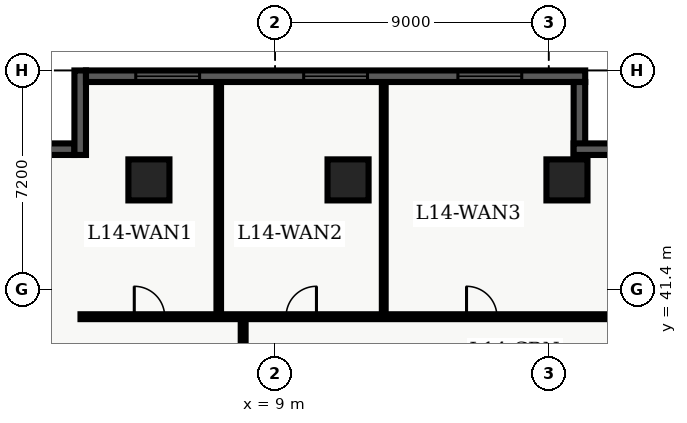
"""IFC4 building model, lengths in metres.
Left out: names, types, materials, properties, quantities, classifications, styles, units other than length and angle.
Written with IfcOpenShell. Run it as: python <this file> out.ifc"""

import sys

from ifc_helpers import new_model, entity, si_unit, converted_unit, direction, frame, origin_with_axes, origin_2d_with_axis, place, context, subcontext, project, spatial, polyline, rectangle, outline, extrude, element, fill, save


model = new_model("IFC4")
c1 = context("Model", 3, precision=1e-05, world=origin_with_axes(), true_north=direction((0.0, 1.0)))
c2 = subcontext(c1, "Body", "Model", "MODEL_VIEW")
j1 = project(units=[si_unit("LENGTHUNIT", "METRE"), converted_unit("PLANEANGLEUNIT", "DEGREE", entity("IfcPlaneAngleMeasure", 0.017), si_unit("PLANEANGLEUNIT", "RADIAN"), dimensions=[0, 0, 0, 0, 0, 0, 0])], contexts=[c1])
p1 = place(None, origin_with_axes())
s1 = spatial("IfcSite", under=j1, at=p1, CompositionType="ELEMENT")
p2 = place(p1, origin_with_axes())
s2 = spatial("IfcBuilding", under=s1, at=p2, CompositionType="ELEMENT")
p3 = place(p2, frame((0.0, 0.0, 60.0), z_axis=(0.0, 0.0, 1.0), x_axis=(1.0, 0.0, 0.0)))
s3 = spatial("IfcBuildingStorey", under=s2, at=p3, CompositionType="ELEMENT", Elevation=60.0)
for number, where, z_axis, x_axis in (
    (1, (11.4, 45.0, 0.0), (0.0, 0.0, 1.0), (1.0, 0.0, 0.0)),
    (2, (18.6, 45.0, 0.0), (0.0, 0.0, 1.0), (1.0, 0.0, 0.0)),
    (3, (4.85, 45.0, 0.0), (0.0, 0.0, 1.0), (1.0, 0.0, 0.0)),
):
    element("IfcColumn", number, at=place(p3, frame(where, z_axis=z_axis, x_axis=x_axis)), inside=s3, PredefinedType="COLUMN", context=c2, shape_type="SweptSolid", body=[
        extrude(rectangle(XDim=1.35, YDim=1.35, at=origin_2d_with_axis()), origin_with_axes(), (0.0, 0.0, 1.0), 3.9),
    ])
p4 = place(p3, frame((2.6, 40.5, 0.0), z_axis=(0.0, 0.0, 1.0), x_axis=(1.0, 0.0, 0.0)))
e4 = element("IfcWall", 4, at=p4, inside=s3, PredefinedType="PARTITIONING", context=c2, shape_type="SweptSolid", body=[
    extrude(outline(polyline([(0.0, -0.08), (18.65, -0.08), (18.65, 0.08), (0.0, 0.08), (0.0, -0.08)])), origin_with_axes(), (0.0, 0.0, 1.0), 2.7),
])
p5 = place(p4, frame((2.268, 0.0, 0.0), z_axis=(0.0, 0.0, 1.0), x_axis=(1.0, 0.0, 0.0)))
e5 = element("IfcOpeningElement", 5, at=p5, cuts=e4, PredefinedType="OPENING", context=c2, shape_type="SweptSolid", body=[
    extrude(rectangle(XDim=1.0, YDim=0.18, at=origin_2d_with_axis()), origin_with_axes(), (0.0, 0.0, 1.0), 2.15),
])
p6 = place(p4, frame((7.261, 0.0, 0.0), z_axis=(0.0, 0.0, 1.0), x_axis=(1.0, 0.0, 0.0)))
e6 = element("IfcOpeningElement", 6, at=p6, cuts=e4, PredefinedType="OPENING", context=c2, shape_type="SweptSolid", body=[
    extrude(rectangle(XDim=1.0, YDim=0.18, at=origin_2d_with_axis()), origin_with_axes(), (0.0, 0.0, 1.0), 2.15),
])
p7 = place(p4, frame((13.197, 0.0, 0.0), z_axis=(0.0, 0.0, 1.0), x_axis=(1.0, 0.0, 0.0)))
e7 = element("IfcOpeningElement", 7, at=p7, cuts=e4, PredefinedType="OPENING", context=c2, shape_type="SweptSolid", body=[
    extrude(rectangle(XDim=1.0, YDim=0.18, at=origin_2d_with_axis()), origin_with_axes(), (0.0, 0.0, 1.0), 2.15),
])
p8 = place(p3, frame((7.95, 7.8, 0.0), z_axis=(0.0, 0.0, 1.0), x_axis=(0.0, 1.0, 0.0)))
e8 = element("IfcWall", 8, at=p8, inside=s3, PredefinedType="PARTITIONING", context=c2, shape_type="SweptSolid", body=[
    extrude(outline(polyline([(0.0, -0.08), (32.7, -0.08), (32.7, 0.08), (0.0, 0.08), (0.0, -0.08)])), origin_with_axes(), (0.0, 0.0, 1.0), 2.7),
])
p9 = place(p8, frame((2.288, 0.0, 0.0), z_axis=(0.0, 0.0, 1.0), x_axis=(1.0, 0.0, 0.0)))
e9 = element("IfcOpeningElement", 9, at=p9, cuts=e8, PredefinedType="OPENING", context=c2, shape_type="SweptSolid", body=[
    extrude(rectangle(XDim=1.0, YDim=0.18, at=origin_2d_with_axis()), origin_with_axes(), (0.0, 0.0, 1.0), 2.15),
])
p10 = place(p8, frame((6.971, 0.0, 0.0), z_axis=(0.0, 0.0, 1.0), x_axis=(1.0, 0.0, 0.0)))
e10 = element("IfcOpeningElement", 10, at=p10, cuts=e8, PredefinedType="OPENING", context=c2, shape_type="SweptSolid", body=[
    extrude(rectangle(XDim=1.0, YDim=0.18, at=origin_2d_with_axis()), origin_with_axes(), (0.0, 0.0, 1.0), 2.15),
])
p11 = place(p8, frame((12.598, 0.0, 0.0), z_axis=(0.0, 0.0, 1.0), x_axis=(1.0, 0.0, 0.0)))
e11 = element("IfcOpeningElement", 11, at=p11, cuts=e8, PredefinedType="OPENING", context=c2, shape_type="SweptSolid", body=[
    extrude(rectangle(XDim=1.0, YDim=0.18, at=origin_2d_with_axis()), origin_with_axes(), (0.0, 0.0, 1.0), 2.15),
])
p12 = place(p8, frame((19.386, 0.0, 0.0), z_axis=(0.0, 0.0, 1.0), x_axis=(1.0, 0.0, 0.0)))
e12 = element("IfcOpeningElement", 12, at=p12, cuts=e8, PredefinedType="OPENING", context=c2, shape_type="SweptSolid", body=[
    extrude(rectangle(XDim=1.0, YDim=0.18, at=origin_2d_with_axis()), origin_with_axes(), (0.0, 0.0, 1.0), 2.15),
])
p13 = place(p8, frame((27.82, 0.0, 0.0), z_axis=(0.0, 0.0, 1.0), x_axis=(1.0, 0.0, 0.0)))
e13 = element("IfcOpeningElement", 13, at=p13, cuts=e8, PredefinedType="OPENING", context=c2, shape_type="SweptSolid", body=[
    extrude(rectangle(XDim=1.0, YDim=0.18, at=origin_2d_with_axis()), origin_with_axes(), (0.0, 0.0, 1.0), 2.15),
])
p14 = place(p3, frame((7.147, 40.6, 0.0), z_axis=(0.0, 0.0, 1.0), x_axis=(0.0, 1.0, 0.0)))
e14 = element("IfcWall", 14, at=p14, inside=s3, PredefinedType="PARTITIONING", context=c2, shape_type="SweptSolid", body=[
    extrude(outline(polyline([(0.0, -0.075), (7.64, -0.075), (7.64, 0.075), (0.0, 0.075), (0.0, -0.075)])), origin_with_axes(), (0.0, 0.0, 1.0), 2.7),
])
p15 = place(p3, frame((12.574, 40.6, 0.0), z_axis=(0.0, 0.0, 1.0), x_axis=(0.0, 1.0, 0.0)))
e15 = element("IfcWall", 15, at=p15, inside=s3, PredefinedType="PARTITIONING", context=c2, shape_type="SweptSolid", body=[
    extrude(outline(polyline([(0.0, -0.062), (7.64, -0.062), (7.64, 0.062), (0.0, 0.062), (0.0, -0.062)])), origin_with_axes(), (0.0, 0.0, 1.0), 2.7),
])
p16 = place(p3, frame((0.38, 46.01, 0.0), z_axis=(0.0, 0.0, 1.0), x_axis=(1.0, 0.0, 0.0)))
e16 = element("IfcWall", 16, at=p16, inside=s3, PredefinedType="SOLIDWALL", context=c2, shape_type="SweptSolid", body=[
    extrude(outline(polyline([(0.0, -0.19), (2.02, -0.19), (2.02, 0.19), (0.0, 0.19), (0.0, -0.19)])), origin_with_axes(), (0.0, 0.0, 1.0), 3.66),
])
p17 = place(p3, frame((2.59, 45.82, 0.0), z_axis=(0.0, 0.0, 1.0), x_axis=(0.0, 1.0, 0.0)))
e17 = element("IfcWall", 17, at=p17, inside=s3, PredefinedType="SOLIDWALL", context=c2, shape_type="SweptSolid", body=[
    extrude(outline(polyline([(0.0, -0.19), (2.78, -0.19), (2.78, 0.19), (0.0, 0.19), (0.0, -0.19)])), origin_with_axes(), (0.0, 0.0, 1.0), 3.66),
])
p18 = place(p3, frame((2.78, 48.41, 0.0), z_axis=(0.0, 0.0, 1.0), x_axis=(1.0, 0.0, 0.0)))
e18 = element("IfcWall", 18, at=p18, inside=s3, PredefinedType="SOLIDWALL", context=c2, shape_type="SweptSolid", body=[
    extrude(outline(polyline([(0.0, -0.19), (16.42, -0.19), (16.42, 0.19), (0.0, 0.19), (0.0, -0.19)])), origin_with_axes(), (0.0, 0.0, 1.0), 3.66),
])
p19 = place(p18, frame((2.687, 0.0, 0.45), z_axis=(0.0, 0.0, 1.0), x_axis=(1.0, 0.0, 0.0)))
e19 = element("IfcOpeningElement", 19, at=p19, cuts=e18, PredefinedType="OPENING", context=c2, shape_type="SweptSolid", body=[
    extrude(rectangle(XDim=2.1, YDim=0.4, at=origin_2d_with_axis()), origin_with_axes(), (0.0, 0.0, 1.0), 2.2),
])
p20 = place(p18, frame((8.21, 0.0, 0.45), z_axis=(0.0, 0.0, 1.0), x_axis=(1.0, 0.0, 0.0)))
e20 = element("IfcOpeningElement", 20, at=p20, cuts=e18, PredefinedType="OPENING", context=c2, shape_type="SweptSolid", body=[
    extrude(rectangle(XDim=2.1, YDim=0.4, at=origin_2d_with_axis()), origin_with_axes(), (0.0, 0.0, 1.0), 2.2),
])
p21 = place(p18, frame((13.283, 0.0, 0.45), z_axis=(0.0, 0.0, 1.0), x_axis=(1.0, 0.0, 0.0)))
e21 = element("IfcOpeningElement", 21, at=p21, cuts=e18, PredefinedType="OPENING", context=c2, shape_type="SweptSolid", body=[
    extrude(rectangle(XDim=2.1, YDim=0.4, at=origin_2d_with_axis()), origin_with_axes(), (0.0, 0.0, 1.0), 2.2),
])
p22 = place(p3, frame((19.01, 48.22, 0.0), z_axis=(0.0, 0.0, 1.0), x_axis=(0.0, -1.0, 0.0)))
e22 = element("IfcWall", 22, at=p22, inside=s3, PredefinedType="SOLIDWALL", context=c2, shape_type="SweptSolid", body=[
    extrude(outline(polyline([(0.0, -0.19), (2.56, -0.19), (2.56, 0.19), (0.0, 0.19), (0.0, -0.19)])), origin_with_axes(), (0.0, 0.0, 1.0), 3.66),
])
p23 = place(p3, frame((18.82, 46.01, 0.0), z_axis=(0.0, 0.0, 1.0), x_axis=(1.0, 0.0, 0.0)))
e23 = element("IfcWall", 23, at=p23, inside=s3, PredefinedType="SOLIDWALL", context=c2, shape_type="SweptSolid", body=[
    extrude(outline(polyline([(0.0, -0.19), (2.78, -0.19), (2.78, 0.19), (0.0, 0.19), (0.0, -0.19)])), origin_with_axes(), (0.0, 0.0, 1.0), 3.66),
])
p24 = place(p4, frame((2.268, 0.0, 0.0), z_axis=(0.0, 0.0, 1.0), x_axis=(1.0, 0.0, 0.0)))
e24 = element("IfcDoor", 24, at=p24, inside=s3, OperationType="SINGLE_SWING_LEFT", PredefinedType="DOOR", context=c2, shape_type="SweptSolid", body=[
    extrude(rectangle(XDim=1.0, YDim=0.09, at=origin_2d_with_axis()), origin_with_axes(), (0.0, 0.0, 1.0), 2.15),
])
fill(e5, e24)
p25 = place(p4, frame((7.261, 0.0, 0.0), z_axis=(0.0, 0.0, 1.0), x_axis=(1.0, 0.0, 0.0)))
e25 = element("IfcDoor", 25, at=p25, inside=s3, OperationType="SINGLE_SWING_RIGHT", PredefinedType="DOOR", context=c2, shape_type="SweptSolid", body=[
    extrude(rectangle(XDim=1.0, YDim=0.09, at=origin_2d_with_axis()), origin_with_axes(), (0.0, 0.0, 1.0), 2.15),
])
fill(e6, e25)
p26 = place(p4, frame((13.197, 0.0, 0.0), z_axis=(0.0, 0.0, 1.0), x_axis=(1.0, 0.0, 0.0)))
e26 = element("IfcDoor", 26, at=p26, inside=s3, OperationType="SINGLE_SWING_LEFT", PredefinedType="DOOR", context=c2, shape_type="SweptSolid", body=[
    extrude(rectangle(XDim=1.0, YDim=0.09, at=origin_2d_with_axis()), origin_with_axes(), (0.0, 0.0, 1.0), 2.15),
])
fill(e7, e26)
p27 = place(p18, frame((2.687, 0.0, 0.45), z_axis=(0.0, 0.0, 1.0), x_axis=(1.0, 0.0, 0.0)))
e27 = element("IfcWindow", 27, at=p27, inside=s3, PredefinedType="WINDOW", context=c2, shape_type="SweptSolid", body=[
    extrude(rectangle(XDim=2.1, YDim=0.09, at=origin_2d_with_axis()), origin_with_axes(), (0.0, 0.0, 1.0), 2.2),
])
fill(e19, e27)
p28 = place(p18, frame((8.21, 0.0, 0.45), z_axis=(0.0, 0.0, 1.0), x_axis=(1.0, 0.0, 0.0)))
e28 = element("IfcWindow", 28, at=p28, inside=s3, PredefinedType="WINDOW", context=c2, shape_type="SweptSolid", body=[
    extrude(rectangle(XDim=2.1, YDim=0.09, at=origin_2d_with_axis()), origin_with_axes(), (0.0, 0.0, 1.0), 2.2),
])
fill(e20, e28)
p29 = place(p18, frame((13.283, 0.0, 0.45), z_axis=(0.0, 0.0, 1.0), x_axis=(1.0, 0.0, 0.0)))
e29 = element("IfcWindow", 29, at=p29, inside=s3, PredefinedType="WINDOW", context=c2, shape_type="SweptSolid", body=[
    extrude(rectangle(XDim=2.1, YDim=0.09, at=origin_2d_with_axis()), origin_with_axes(), (0.0, 0.0, 1.0), 2.2),
])
fill(e21, e29)
save(model, sys.argv[1])
